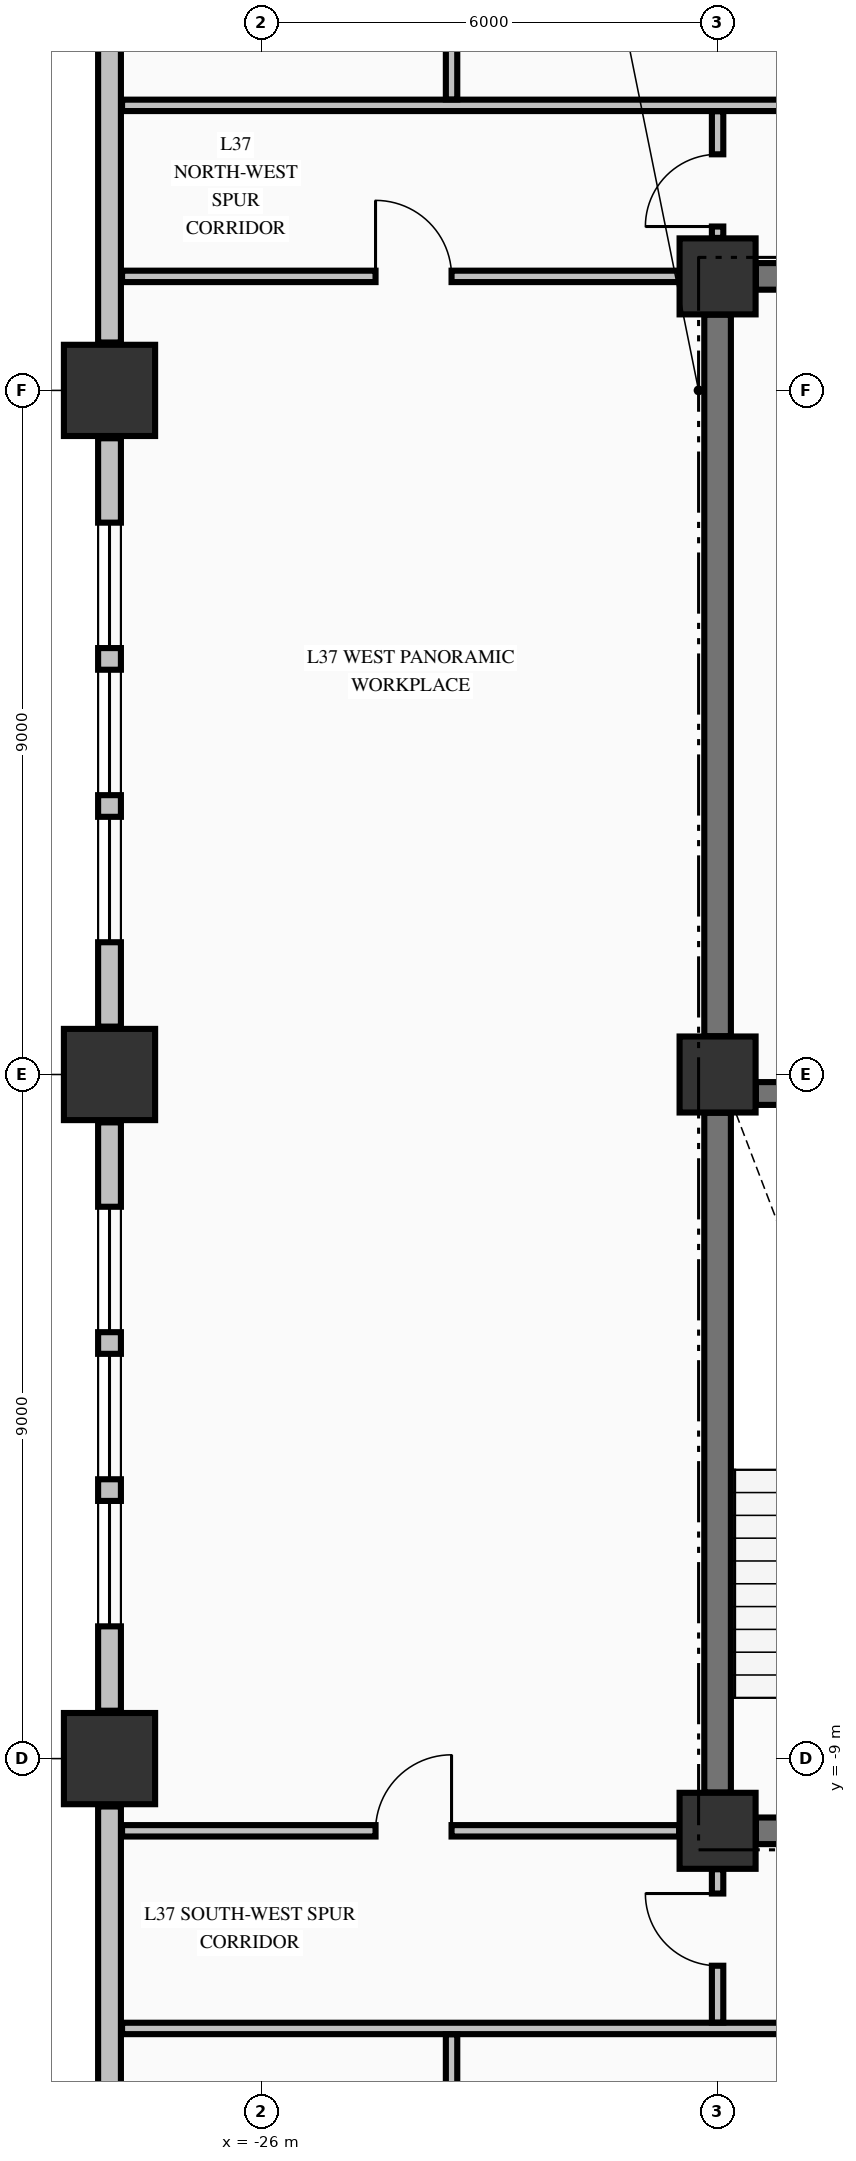
"""IFC4 building model, lengths in metres.
Left out: names, types, materials, properties, quantities, classifications, styles, units other than length and angle.
Written with IfcOpenShell. Run it as: python <this file> out.ifc"""

import sys

from ifc_helpers import new_model, si_unit, direction, frame, frame_2d, origin, origin_2d, place, context, subcontext, project, spatial, rectangle, extrude, element, fill, save


model = new_model("IFC4")
c1 = context("Model", 3, precision=1e-05, world=origin(), true_north=direction((0.0, 1.0)))
c2 = subcontext(c1, "Body", "Model", "MODEL_VIEW")
j1 = project(units=[si_unit("LENGTHUNIT", "METRE"), si_unit("PLANEANGLEUNIT", "RADIAN")], contexts=[c1])
p1 = place(None, origin())
s1 = spatial("IfcSite", under=j1, at=p1, CompositionType="ELEMENT")
p2 = place(p1, origin())
s2 = spatial("IfcBuilding", under=s1, at=p2, CompositionType="ELEMENT")
p3 = place(p2, frame((0.0, 0.0, 146.34)))
s3 = spatial("IfcBuildingStorey", under=s2, at=p3, CompositionType="ELEMENT", Elevation=146.34)
for number, where, z_axis, x_axis in (
    (1, (-28.0, -9.0, -0.25), (0.0, 0.0, 1.0), (1.0, 0.0, 0.0)),
    (2, (-28.0, 0.0, -0.25), (0.0, 0.0, 1.0), (1.0, 0.0, 0.0)),
    (3, (-28.0, 9.0, -0.25), (0.0, 0.0, 1.0), (1.0, 0.0, 0.0)),
):
    element("IfcColumn", number, at=place(p3, frame(where, z_axis=z_axis, x_axis=x_axis)), inside=s3, PredefinedType="COLUMN", context=c2, shape_type="SweptSolid", body=[
        extrude(rectangle(XDim=1.2, YDim=1.2, at=origin_2d()), origin(), (0.0, 0.0, 1.0), 3.57),
    ])
for number, where, z_axis, x_axis in (
    (4, (-20.0, -9.95, -0.25), (0.0, 0.0, 1.0), (1.0, 0.0, 0.0)),
    (5, (-20.0, 10.5, -0.25), (0.0, 0.0, 1.0), (1.0, 0.0, 0.0)),
    (6, (-20.0, 0.0, -0.25), (0.0, 0.0, 1.0), (1.0, 0.0, 0.0)),
):
    element("IfcColumn", number, at=place(p3, frame(where, z_axis=z_axis, x_axis=x_axis)), inside=s3, PredefinedType="COLUMN", context=c2, shape_type="SweptSolid", body=[
        extrude(rectangle(XDim=1.0, YDim=1.0, at=origin_2d()), origin(), (0.0, 0.0, 1.0), 3.57),
    ])
p4 = place(p3, frame((-28.0, -9.63, 0.0), z_axis=(0.0, 0.0, 1.0), x_axis=(0.0, -1.0, 0.0)))
e7 = element("IfcWall", 7, at=p4, inside=s3, PredefinedType="STANDARD", context=c2, shape_type="SweptSolid", body=[
    extrude(rectangle(XDim=10.74, YDim=0.3, at=frame_2d((5.37, 0.0))), origin(), (0.0, 0.0, 1.0), 2.712),
])
p5 = place(p3, frame((-28.0, -0.63, 0.0), z_axis=(0.0, 0.0, 1.0), x_axis=(0.0, -1.0, 0.0)))
e8 = element("IfcWall", 8, at=p5, inside=s3, PredefinedType="STANDARD", context=c2, shape_type="SweptSolid", body=[
    extrude(rectangle(XDim=7.74, YDim=0.3, at=frame_2d((3.87, 0.0))), origin(), (0.0, 0.0, 1.0), 2.712),
])
p6 = place(p5, frame((1.11, 0.0, 0.8)))
e9 = element("IfcOpeningElement", 9, at=p6, cuts=e8, PredefinedType="OPENING", context=c2, shape_type="SweptSolid", body=[
    extrude(rectangle(XDim=1.65, YDim=1.7, at=frame_2d((0.825, 0.85))), frame((0.0, 0.16, 0.0), z_axis=(0.0, -1.0, 0.0), x_axis=(1.0, 0.0, 0.0)), (0.0, 0.0, 1.0), 0.32),
])
p7 = place(p5, frame((3.045, 0.0, 0.8)))
e10 = element("IfcOpeningElement", 10, at=p7, cuts=e8, PredefinedType="OPENING", context=c2, shape_type="SweptSolid", body=[
    extrude(rectangle(XDim=1.65, YDim=1.7, at=frame_2d((0.825, 0.85))), frame((0.0, 0.16, 0.0), z_axis=(0.0, -1.0, 0.0), x_axis=(1.0, 0.0, 0.0)), (0.0, 0.0, 1.0), 0.32),
])
p8 = place(p5, frame((4.98, 0.0, 0.8)))
e11 = element("IfcOpeningElement", 11, at=p8, cuts=e8, PredefinedType="OPENING", context=c2, shape_type="SweptSolid", body=[
    extrude(rectangle(XDim=1.65, YDim=1.7, at=frame_2d((0.825, 0.85))), frame((0.0, 0.16, 0.0), z_axis=(0.0, -1.0, 0.0), x_axis=(1.0, 0.0, 0.0)), (0.0, 0.0, 1.0), 0.32),
])
p9 = place(p3, frame((-28.0, 8.37, 0.0), z_axis=(0.0, 0.0, 1.0), x_axis=(0.0, -1.0, 0.0)))
e12 = element("IfcWall", 12, at=p9, inside=s3, PredefinedType="STANDARD", context=c2, shape_type="SweptSolid", body=[
    extrude(rectangle(XDim=7.74, YDim=0.3, at=frame_2d((3.87, 0.0))), origin(), (0.0, 0.0, 1.0), 2.712),
])
p10 = place(p9, frame((1.11, 0.0, 0.8)))
e13 = element("IfcOpeningElement", 13, at=p10, cuts=e12, PredefinedType="OPENING", context=c2, shape_type="SweptSolid", body=[
    extrude(rectangle(XDim=1.65, YDim=1.7, at=frame_2d((0.825, 0.85))), frame((0.0, 0.16, 0.0), z_axis=(0.0, -1.0, 0.0), x_axis=(1.0, 0.0, 0.0)), (0.0, 0.0, 1.0), 0.32),
])
p11 = place(p9, frame((3.045, 0.0, 0.8)))
e14 = element("IfcOpeningElement", 14, at=p11, cuts=e12, PredefinedType="OPENING", context=c2, shape_type="SweptSolid", body=[
    extrude(rectangle(XDim=1.65, YDim=1.7, at=frame_2d((0.825, 0.85))), frame((0.0, 0.16, 0.0), z_axis=(0.0, -1.0, 0.0), x_axis=(1.0, 0.0, 0.0)), (0.0, 0.0, 1.0), 0.32),
])
p12 = place(p9, frame((4.98, 0.0, 0.8)))
e15 = element("IfcOpeningElement", 15, at=p12, cuts=e12, PredefinedType="OPENING", context=c2, shape_type="SweptSolid", body=[
    extrude(rectangle(XDim=1.65, YDim=1.7, at=frame_2d((0.825, 0.85))), frame((0.0, 0.16, 0.0), z_axis=(0.0, -1.0, 0.0), x_axis=(1.0, 0.0, 0.0)), (0.0, 0.0, 1.0), 0.32),
])
p13 = place(p3, frame((-28.0, 20.37, 0.0), z_axis=(0.0, 0.0, 1.0), x_axis=(0.0, -1.0, 0.0)))
e16 = element("IfcWall", 16, at=p13, inside=s3, PredefinedType="STANDARD", context=c2, shape_type="SweptSolid", body=[
    extrude(rectangle(XDim=10.74, YDim=0.3, at=frame_2d((5.37, 0.0))), origin(), (0.0, 0.0, 1.0), 2.712),
])
p14 = place(p3, frame((-19.496, -9.95, 0.0), z_axis=(0.0, 0.0, 1.0), x_axis=(1.0, 0.0, 0.0)))
e17 = element("IfcWall", 17, at=p14, inside=s3, PredefinedType="SHEAR", context=c2, shape_type="SweptSolid", body=[
    extrude(rectangle(XDim=4.796, YDim=0.35, at=frame_2d((2.398, 0.0))), origin(), (0.0, 0.0, 1.0), 3.32),
])
p15 = place(p14, frame((0.671, 0.0, 0.0)))
e18 = element("IfcOpeningElement", 18, at=p15, cuts=e17, PredefinedType="OPENING", context=c2, shape_type="SweptSolid", body=[
    extrude(rectangle(XDim=1.05, YDim=2.15, at=frame_2d((0.525, 1.075))), frame((0.0, 0.185, 0.0), z_axis=(0.0, -1.0, 0.0), x_axis=(1.0, 0.0, 0.0)), (0.0, 0.0, 1.0), 0.37),
])
p16 = place(p3, frame((-19.496, -0.25, 0.0), z_axis=(0.0, 0.0, 1.0), x_axis=(1.0, 0.0, 0.0)))
e19 = element("IfcWall", 19, at=p16, inside=s3, PredefinedType="SHEAR", context=c2, shape_type="SweptSolid", body=[
    extrude(rectangle(XDim=7.992, YDim=0.3, at=frame_2d((3.996, 0.0))), origin(), (0.0, 0.0, 1.0), 3.32),
])
p17 = place(p16, frame((5.796, 0.0, 0.0)))
e20 = element("IfcOpeningElement", 20, at=p17, cuts=e19, PredefinedType="OPENING", context=c2, shape_type="SweptSolid", body=[
    extrude(rectangle(XDim=1.1, YDim=2.15, at=frame_2d((0.55, 1.075))), frame((0.0, 0.16, 0.0), z_axis=(0.0, -1.0, 0.0), x_axis=(1.0, 0.0, 0.0)), (0.0, 0.0, 1.0), 0.32),
])
p18 = place(p3, frame((-19.496, 10.5, 0.0), z_axis=(0.0, 0.0, 1.0), x_axis=(1.0, 0.0, 0.0)))
e21 = element("IfcWall", 21, at=p18, inside=s3, PredefinedType="SHEAR", context=c2, shape_type="SweptSolid", body=[
    extrude(rectangle(XDim=4.796, YDim=0.35, at=frame_2d((2.398, 0.0))), origin(), (0.0, 0.0, 1.0), 3.32),
])
p19 = place(p18, frame((0.646, 0.0, 0.0)))
e22 = element("IfcOpeningElement", 22, at=p19, cuts=e21, PredefinedType="OPENING", context=c2, shape_type="SweptSolid", body=[
    extrude(rectangle(XDim=0.9, YDim=2.15, at=frame_2d((0.45, 1.075))), frame((0.0, 0.185, 0.0), z_axis=(0.0, -1.0, 0.0), x_axis=(1.0, 0.0, 0.0)), (0.0, 0.0, 1.0), 0.37),
])
p20 = place(p18, frame((3.271, 0.0, 0.0)))
e23 = element("IfcOpeningElement", 23, at=p20, cuts=e21, PredefinedType="OPENING", context=c2, shape_type="SweptSolid", body=[
    extrude(rectangle(XDim=0.95, YDim=2.15, at=frame_2d((0.475, 1.075))), frame((0.0, 0.185, 0.0), z_axis=(0.0, -1.0, 0.0), x_axis=(1.0, 0.0, 0.0)), (0.0, 0.0, 1.0), 0.37),
])
p21 = place(p3, frame((-27.835, -12.55, 0.0), z_axis=(0.0, 0.0, 1.0), x_axis=(1.0, 0.0, 0.0)))
e24 = element("IfcWall", 24, at=p21, inside=s3, PredefinedType="PARTITIONING", context=c2, shape_type="SweptSolid", body=[
    extrude(rectangle(XDim=50.67, YDim=0.15, at=frame_2d((25.335, 0.0))), origin(), (0.0, 0.0, 1.0), 3.32),
])
p22 = place(p21, frame((29.685, 0.0, 0.0)))
e25 = element("IfcOpeningElement", 25, at=p22, cuts=e24, PredefinedType="OPENING", context=c2, shape_type="SweptSolid", body=[
    extrude(rectangle(XDim=1.1, YDim=2.15, at=frame_2d((0.55, 1.075))), frame((0.0, 0.085, 0.0), z_axis=(0.0, -1.0, 0.0), x_axis=(1.0, 0.0, 0.0)), (0.0, 0.0, 1.0), 0.17),
])
p23 = place(p21, frame((14.41, 0.0, 0.0)))
e26 = element("IfcOpeningElement", 26, at=p23, cuts=e24, PredefinedType="OPENING", context=c2, shape_type="SweptSolid", body=[
    extrude(rectangle(XDim=1.05, YDim=2.15, at=frame_2d((0.525, 1.075))), frame((0.0, 0.085, 0.0), z_axis=(0.0, -1.0, 0.0), x_axis=(1.0, 0.0, 0.0)), (0.0, 0.0, 1.0), 0.17),
])
p24 = place(p21, frame((34.96, 0.0, 0.0)))
e27 = element("IfcOpeningElement", 27, at=p24, cuts=e24, PredefinedType="OPENING", context=c2, shape_type="SweptSolid", body=[
    extrude(rectangle(XDim=1.05, YDim=2.15, at=frame_2d((0.525, 1.075))), frame((0.0, 0.085, 0.0), z_axis=(0.0, -1.0, 0.0), x_axis=(1.0, 0.0, 0.0)), (0.0, 0.0, 1.0), 0.17),
])
p25 = place(p3, frame((-27.835, -9.95, 0.0), z_axis=(0.0, 0.0, 1.0), x_axis=(1.0, 0.0, 0.0)))
e28 = element("IfcWall", 28, at=p25, inside=s3, PredefinedType="PARTITIONING", context=c2, shape_type="SweptSolid", body=[
    extrude(rectangle(XDim=7.329, YDim=0.15, at=frame_2d((3.665, 0.0))), origin(), (0.0, 0.0, 1.0), 3.32),
])
p26 = place(p25, frame((3.335, 0.0, 0.0)))
e29 = element("IfcOpeningElement", 29, at=p26, cuts=e28, PredefinedType="OPENING", context=c2, shape_type="SweptSolid", body=[
    extrude(rectangle(XDim=1.0, YDim=2.15, at=frame_2d((0.5, 1.075))), frame((0.0, 0.085, 0.0), z_axis=(0.0, -1.0, 0.0), x_axis=(1.0, 0.0, 0.0)), (0.0, 0.0, 1.0), 0.17),
])
p27 = place(p3, frame((-27.835, 10.5, 0.0), z_axis=(0.0, 0.0, 1.0), x_axis=(1.0, 0.0, 0.0)))
e30 = element("IfcWall", 30, at=p27, inside=s3, PredefinedType="PARTITIONING", context=c2, shape_type="SweptSolid", body=[
    extrude(rectangle(XDim=7.329, YDim=0.15, at=frame_2d((3.665, 0.0))), origin(), (0.0, 0.0, 1.0), 3.32),
])
p28 = place(p27, frame((3.335, 0.0, 0.0)))
e31 = element("IfcOpeningElement", 31, at=p28, cuts=e30, PredefinedType="OPENING", context=c2, shape_type="SweptSolid", body=[
    extrude(rectangle(XDim=1.0, YDim=2.15, at=frame_2d((0.5, 1.075))), frame((0.0, 0.085, 0.0), z_axis=(0.0, -1.0, 0.0), x_axis=(1.0, 0.0, 0.0)), (0.0, 0.0, 1.0), 0.17),
])
p29 = place(p3, frame((-27.835, 12.75, 0.0), z_axis=(0.0, 0.0, 1.0), x_axis=(1.0, 0.0, 0.0)))
e32 = element("IfcWall", 32, at=p29, inside=s3, PredefinedType="PARTITIONING", context=c2, shape_type="SweptSolid", body=[
    extrude(rectangle(XDim=50.67, YDim=0.15, at=frame_2d((25.335, 0.0))), origin(), (0.0, 0.0, 1.0), 3.32),
])
p30 = place(p29, frame((19.03, 0.0, 0.0)))
e33 = element("IfcOpeningElement", 33, at=p30, cuts=e32, PredefinedType="OPENING", context=c2, shape_type="SweptSolid", body=[
    extrude(rectangle(XDim=1.05, YDim=2.15, at=frame_2d((0.525, 1.075))), frame((0.0, 0.085, 0.0), z_axis=(0.0, -1.0, 0.0), x_axis=(1.0, 0.0, 0.0)), (0.0, 0.0, 1.0), 0.17),
])
p31 = place(p29, frame((44.16, 0.0, 0.0)))
e34 = element("IfcOpeningElement", 34, at=p31, cuts=e32, PredefinedType="OPENING", context=c2, shape_type="SweptSolid", body=[
    extrude(rectangle(XDim=1.05, YDim=2.15, at=frame_2d((0.525, 1.075))), frame((0.0, 0.085, 0.0), z_axis=(0.0, -1.0, 0.0), x_axis=(1.0, 0.0, 0.0)), (0.0, 0.0, 1.0), 0.17),
])
p32 = place(p3, frame((-20.0, -9.446, 0.0), z_axis=(0.0, 0.0, 1.0), x_axis=(0.0, 1.0, 0.0)))
e35 = element("IfcWall", 35, at=p32, inside=s3, PredefinedType="SHEAR", context=c2, shape_type="SweptSolid", body=[
    extrude(rectangle(XDim=8.942, YDim=0.35, at=frame_2d((4.471, 0.0))), origin(), (0.0, 0.0, 1.0), 3.32),
])
p33 = place(p3, frame((-20.0, 0.504, 0.0), z_axis=(0.0, 0.0, 1.0), x_axis=(0.0, 1.0, 0.0)))
e36 = element("IfcWall", 36, at=p33, inside=s3, PredefinedType="SHEAR", context=c2, shape_type="SweptSolid", body=[
    extrude(rectangle(XDim=9.492, YDim=0.35, at=frame_2d((4.746, 0.0))), origin(), (0.0, 0.0, 1.0), 3.32),
])
p34 = place(p3, frame((-23.5, -20.394, 0.0), z_axis=(0.0, 0.0, 1.0), x_axis=(0.0, 1.0, 0.0)))
e37 = element("IfcWall", 37, at=p34, inside=s3, PredefinedType="PARTITIONING", context=c2, shape_type="SweptSolid", body=[
    extrude(rectangle(XDim=7.766, YDim=0.15, at=frame_2d((3.883, 0.0))), origin(), (0.0, 0.0, 1.0), 3.32),
])
p35 = place(p3, frame((-23.5, 12.828, 0.0), z_axis=(0.0, 0.0, 1.0), x_axis=(0.0, 1.0, 0.0)))
e38 = element("IfcWall", 38, at=p35, inside=s3, PredefinedType="PARTITIONING", context=c2, shape_type="SweptSolid", body=[
    extrude(rectangle(XDim=7.566, YDim=0.15, at=frame_2d((3.783, 0.0))), origin(), (0.0, 0.0, 1.0), 3.32),
])
p36 = place(p3, frame((-20.0, -12.472, 0.0), z_axis=(0.0, 0.0, 1.0), x_axis=(0.0, 1.0, 0.0)))
e39 = element("IfcWall", 39, at=p36, inside=s3, PredefinedType="PARTITIONING", context=c2, shape_type="SweptSolid", body=[
    extrude(rectangle(XDim=2.016, YDim=0.15, at=frame_2d((1.008, 0.0))), origin(), (0.0, 0.0, 1.0), 2.81),
])
p37 = place(p36, frame((0.747, 0.0, 0.0)))
e40 = element("IfcOpeningElement", 40, at=p37, cuts=e39, PredefinedType="OPENING", context=c2, shape_type="SweptSolid", body=[
    extrude(rectangle(XDim=0.95, YDim=2.15, at=frame_2d((0.475, 1.075))), frame((0.0, 0.085, 0.0), z_axis=(0.0, -1.0, 0.0), x_axis=(1.0, 0.0, 0.0)), (0.0, 0.0, 1.0), 0.17),
])
p38 = place(p3, frame((-20.0, 11.006, 0.0), z_axis=(0.0, 0.0, 1.0), x_axis=(0.0, 1.0, 0.0)))
e41 = element("IfcWall", 41, at=p38, inside=s3, PredefinedType="PARTITIONING", context=c2, shape_type="SweptSolid", body=[
    extrude(rectangle(XDim=1.666, YDim=0.15, at=frame_2d((0.833, 0.0))), origin(), (0.0, 0.0, 1.0), 2.81),
])
p39 = place(p38, frame((0.15, 0.0, 0.0)))
e42 = element("IfcOpeningElement", 42, at=p39, cuts=e41, PredefinedType="OPENING", context=c2, shape_type="SweptSolid", body=[
    extrude(rectangle(XDim=0.95, YDim=2.15, at=frame_2d((0.475, 1.075))), frame((0.0, 0.085, 0.0), z_axis=(0.0, -1.0, 0.0), x_axis=(1.0, 0.0, 0.0)), (0.0, 0.0, 1.0), 0.17),
])
p40 = place(p6, origin())
e43 = element("IfcWindow", 43, at=p40, inside=s3, PartitioningType="SINGLE_PANEL", PredefinedType="WINDOW", context=c2, shape_type="SweptSolid", body=[
    extrude(rectangle(XDim=1.65, YDim=1.7, at=frame_2d((0.825, 0.85))), frame((0.0, 0.03, 0.0), z_axis=(0.0, -1.0, 0.0), x_axis=(1.0, 0.0, 0.0)), (0.0, 0.0, 1.0), 0.06),
])
fill(e9, e43)
p41 = place(p7, origin())
e44 = element("IfcWindow", 44, at=p41, inside=s3, PartitioningType="SINGLE_PANEL", PredefinedType="WINDOW", context=c2, shape_type="SweptSolid", body=[
    extrude(rectangle(XDim=1.65, YDim=1.7, at=frame_2d((0.825, 0.85))), frame((0.0, 0.03, 0.0), z_axis=(0.0, -1.0, 0.0), x_axis=(1.0, 0.0, 0.0)), (0.0, 0.0, 1.0), 0.06),
])
fill(e10, e44)
p42 = place(p8, origin())
e45 = element("IfcWindow", 45, at=p42, inside=s3, PartitioningType="SINGLE_PANEL", PredefinedType="WINDOW", context=c2, shape_type="SweptSolid", body=[
    extrude(rectangle(XDim=1.65, YDim=1.7, at=frame_2d((0.825, 0.85))), frame((0.0, 0.03, 0.0), z_axis=(0.0, -1.0, 0.0), x_axis=(1.0, 0.0, 0.0)), (0.0, 0.0, 1.0), 0.06),
])
fill(e11, e45)
p43 = place(p10, origin())
e46 = element("IfcWindow", 46, at=p43, inside=s3, PartitioningType="SINGLE_PANEL", PredefinedType="WINDOW", context=c2, shape_type="SweptSolid", body=[
    extrude(rectangle(XDim=1.65, YDim=1.7, at=frame_2d((0.825, 0.85))), frame((0.0, 0.03, 0.0), z_axis=(0.0, -1.0, 0.0), x_axis=(1.0, 0.0, 0.0)), (0.0, 0.0, 1.0), 0.06),
])
fill(e13, e46)
p44 = place(p11, origin())
e47 = element("IfcWindow", 47, at=p44, inside=s3, PartitioningType="SINGLE_PANEL", PredefinedType="WINDOW", context=c2, shape_type="SweptSolid", body=[
    extrude(rectangle(XDim=1.65, YDim=1.7, at=frame_2d((0.825, 0.85))), frame((0.0, 0.03, 0.0), z_axis=(0.0, -1.0, 0.0), x_axis=(1.0, 0.0, 0.0)), (0.0, 0.0, 1.0), 0.06),
])
fill(e14, e47)
p45 = place(p12, origin())
e48 = element("IfcWindow", 48, at=p45, inside=s3, PartitioningType="SINGLE_PANEL", PredefinedType="WINDOW", context=c2, shape_type="SweptSolid", body=[
    extrude(rectangle(XDim=1.65, YDim=1.7, at=frame_2d((0.825, 0.85))), frame((0.0, 0.03, 0.0), z_axis=(0.0, -1.0, 0.0), x_axis=(1.0, 0.0, 0.0)), (0.0, 0.0, 1.0), 0.06),
])
fill(e15, e48)
p46 = place(p39, origin())
e49 = element("IfcDoor", 49, at=p46, inside=s3, OperationType="SINGLE_SWING_LEFT", PredefinedType="DOOR", context=c2, shape_type="SweptSolid", body=[
    extrude(rectangle(XDim=0.95, YDim=2.15, at=frame_2d((0.475, 1.075))), frame((0.0, 0.025, 0.0), z_axis=(0.0, -1.0, 0.0), x_axis=(1.0, 0.0, 0.0)), (0.0, 0.0, 1.0), 0.05),
])
fill(e42, e49)
p47 = place(p37, origin())
e50 = element("IfcDoor", 50, at=p47, inside=s3, OperationType="SINGLE_SWING_RIGHT", PredefinedType="DOOR", context=c2, shape_type="SweptSolid", body=[
    extrude(rectangle(XDim=0.95, YDim=2.15, at=frame_2d((0.475, 1.075))), frame((0.0, 0.025, 0.0), z_axis=(0.0, -1.0, 0.0), x_axis=(1.0, 0.0, 0.0)), (0.0, 0.0, 1.0), 0.05),
])
fill(e40, e50)
p48 = place(p28, origin())
e51 = element("IfcDoor", 51, at=p48, inside=s3, OperationType="SINGLE_SWING_LEFT", PredefinedType="DOOR", context=c2, shape_type="SweptSolid", body=[
    extrude(rectangle(XDim=1.0, YDim=2.15, at=frame_2d((0.5, 1.075))), frame((0.0, 0.025, 0.0), z_axis=(0.0, -1.0, 0.0), x_axis=(1.0, 0.0, 0.0)), (0.0, 0.0, 1.0), 0.05),
])
fill(e31, e51)
p49 = place(p26, origin())
e52 = element("IfcDoor", 52, at=p49, inside=s3, OperationType="SINGLE_SWING_RIGHT", PredefinedType="DOOR", context=c2, shape_type="SweptSolid", body=[
    extrude(rectangle(XDim=1.0, YDim=2.15, at=frame_2d((0.5, 1.075))), frame((0.0, 0.025, 0.0), z_axis=(0.0, -1.0, 0.0), x_axis=(1.0, 0.0, 0.0)), (0.0, 0.0, 1.0), 0.05),
])
fill(e29, e52)
save(model, sys.argv[1])
